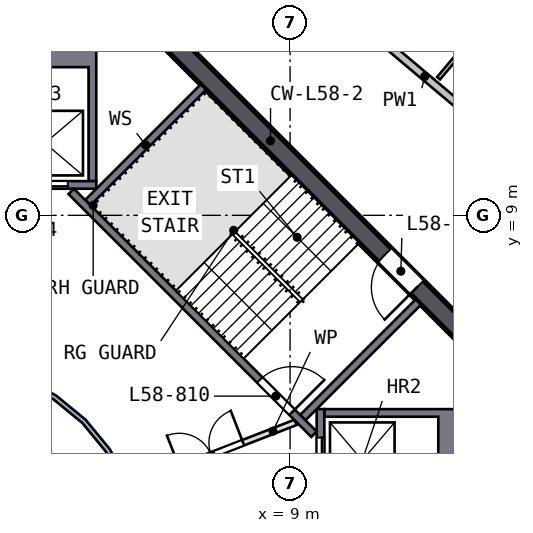
"""IFC4 building model, lengths in metres.
Left out: names, types, materials, properties, quantities, classifications, styles, units other than length and angle.
Written with IfcOpenShell. Run it as: python <this file> out.ifc"""

import sys

from ifc_helpers import new_model, si_unit, direction, frame, frame_2d, origin, place, context, subcontext, project, spatial, polyline, rectangle, outline, extrude, element, fill, save


model = new_model("IFC4")
c1 = context("Model", 3, precision=1e-05, world=origin(), true_north=direction((0.0, 1.0)))
c2 = subcontext(c1, "Body", "Model", "MODEL_VIEW")
j1 = project(units=[si_unit("LENGTHUNIT", "METRE"), si_unit("PLANEANGLEUNIT", "RADIAN")], contexts=[c1])
p1 = place(None, origin())
s1 = spatial("IfcSite", under=j1, at=p1, CompositionType="ELEMENT")
p2 = place(p1, origin())
s2 = spatial("IfcBuilding", under=s1, at=p2, CompositionType="ELEMENT")
p3 = place(p2, frame((0.0, 0.0, 237.5)))
s3 = spatial("IfcBuildingStorey", under=s2, at=p3, CompositionType="ELEMENT", Elevation=237.5)
p4 = place(p3, frame((13.823, 5.622, 0.0), z_axis=(0.0, 0.0, 1.0), x_axis=(-0.707106781, 0.707106781, 0.0)))
e1 = element("IfcWall", 1, at=p4, inside=s3, PredefinedType="SHEAR", context=c2, shape_type="SweptSolid", body=[
    extrude(rectangle(XDim=11.598, YDim=0.5, at=frame_2d((5.799, 0.0))), origin(), (0.0, 0.0, 1.0), 3.5),
])
p5 = place(p4, frame((2.099, 0.0, 0.0)))
e2 = element("IfcOpeningElement", 2, at=p5, cuts=e1, PredefinedType="OPENING", context=c2, shape_type="SweptSolid", body=[
    extrude(rectangle(XDim=1.2, YDim=2.1, at=frame_2d((0.6, 1.05))), frame((0.0, 0.26, 0.0), z_axis=(0.0, -1.0, 0.0), x_axis=(1.0, 0.0, 0.0)), (0.0, 0.0, 1.0), 0.52),
])
p6 = place(p3, origin())
e3 = element("IfcWall", 3, at=p6, inside=s3, PredefinedType="SOLIDWALL", context=c2, shape_type="SweptSolid", body=[
    extrude(outline(polyline([(13.5, 3.9), (13.5, 1.2), (9.9, 1.2), (9.9, 1.4), (12.9, 1.4), (12.9, 3.7), (9.9, 3.7), (9.9, 3.9), (13.5, 3.9)])), origin(), (0.0, 0.0, 1.0), 3.19),
])
p7 = place(p3, frame((9.8, 1.2, 0.0), z_axis=(0.0, 0.0, 1.0), x_axis=(0.0, 1.0, 0.0)))
e4 = element("IfcWall", 4, at=p7, inside=s3, PredefinedType="SOLIDWALL", context=c2, shape_type="SweptSolid", body=[
    extrude(rectangle(XDim=2.7, YDim=0.2, at=frame_2d((1.35, 0.0))), origin(), (0.0, 0.0, 1.0), 3.19),
])
p8 = place(p7, frame((0.75, 0.0, 0.0)))
e5 = element("IfcOpeningElement", 5, at=p8, cuts=e4, PredefinedType="OPENING", context=c2, shape_type="SweptSolid", body=[
    extrude(rectangle(XDim=1.2, YDim=2.1, at=frame_2d((0.6, 1.05))), frame((0.0, 0.11, 0.0), z_axis=(0.0, -1.0, 0.0), x_axis=(1.0, 0.0, 0.0)), (0.0, 0.0, 1.0), 0.22),
])
p9 = place(p3, origin())
e6 = element("IfcWall", 6, at=p9, inside=s3, PredefinedType="SOLIDWALL", context=c2, shape_type="SweptSolid", body=[
    extrude(outline(polyline([(3.9, 9.9), (3.7, 9.9), (3.7, 12.9), (1.4, 12.9), (1.4, 9.9), (1.2, 9.9), (1.2, 13.5), (3.9, 13.5), (3.9, 9.9)])), origin(), (0.0, 0.0, 1.0), 3.19),
])
p10 = place(p3, frame((1.2, 9.8, 0.0), z_axis=(0.0, 0.0, 1.0), x_axis=(1.0, 0.0, 0.0)))
e7 = element("IfcWall", 7, at=p10, inside=s3, PredefinedType="SOLIDWALL", context=c2, shape_type="SweptSolid", body=[
    extrude(rectangle(XDim=2.7, YDim=0.2, at=frame_2d((1.35, 0.0))), origin(), (0.0, 0.0, 1.0), 3.19),
])
p11 = place(p10, frame((0.75, 0.0, 0.0)))
e8 = element("IfcOpeningElement", 8, at=p11, cuts=e7, PredefinedType="OPENING", context=c2, shape_type="SweptSolid", body=[
    extrude(rectangle(XDim=1.2, YDim=2.1, at=frame_2d((0.6, 1.05))), frame((0.0, 0.11, 0.0), z_axis=(0.0, -1.0, 0.0), x_axis=(1.0, 0.0, 0.0)), (0.0, 0.0, 1.0), 0.22),
])
p12 = place(p3, frame((3.24, 9.629, 0.0), z_axis=(0.0, 0.0, 1.0), x_axis=(0.707106781, -0.707106781, 0.0)))
e9 = element("IfcWall", 9, at=p12, inside=s3, PredefinedType="SOLIDWALL", context=c2, shape_type="SweptSolid", body=[
    extrude(rectangle(XDim=9.036, YDim=0.2, at=frame_2d((4.518, 0.0))), origin(), (0.0, 0.0, 1.0), 3.19),
])
p13 = place(p12, frame((7.018, 0.0, 0.0)))
e10 = element("IfcOpeningElement", 10, at=p13, cuts=e9, PredefinedType="OPENING", context=c2, shape_type="SweptSolid", body=[
    extrude(rectangle(XDim=1.2, YDim=2.1, at=frame_2d((0.6, 1.05))), frame((0.0, 0.11, 0.0), z_axis=(0.0, -1.0, 0.0), x_axis=(1.0, 0.0, 0.0)), (0.0, 0.0, 1.0), 0.22),
])
for number, where, z_axis, x_axis in (
    (11, (9.334, 3.677, 0.0), (0.0, 0.0, 1.0), (0.707, 0.707, 0.0)),
    (12, (3.677, 9.334, 0.0), (0.0, 0.0, 1.0), (0.707, 0.707, 0.0)),
):
    element("IfcWall", number, at=place(p3, frame(where, z_axis=z_axis, x_axis=x_axis)), inside=s3, PredefinedType="SOLIDWALL", context=c2, shape_type="SweptSolid", body=[
        extrude(rectangle(XDim=4.3, YDim=0.2, at=frame_2d((2.15, 0.0))), origin(), (0.0, 0.0, 1.0), 3.19),
    ])
p14 = place(p3, frame((4.782, 1.857, 0.0), z_axis=(0.0, 0.0, 1.0), x_axis=(0.932155279, 0.362058746, 0.0)))
e13 = element("IfcWall", 13, at=p14, inside=s3, PredefinedType="PARTITIONING", context=c2, shape_type="SweptSolid", body=[
    extrude(rectangle(XDim=4.682, YDim=0.15, at=frame_2d((2.341, 0.0))), origin(), (0.0, 0.0, 1.0), 3.19),
])
p15 = place(p14, frame((1.4, 0.0, 0.0)))
e14 = element("IfcOpeningElement", 14, at=p15, cuts=e13, PredefinedType="OPENING", context=c2, shape_type="SweptSolid", body=[
    extrude(rectangle(XDim=1.8, YDim=2.1, at=frame_2d((0.9, 1.05))), frame((0.0, 0.085, 0.0), z_axis=(0.0, -1.0, 0.0), x_axis=(1.0, 0.0, 0.0)), (0.0, 0.0, 1.0), 0.17),
])
p16 = place(p3, origin())
e15 = element("IfcWall", 15, at=p16, inside=s3, PredefinedType="SOLIDWALL", context=c2, shape_type="SweptSolid", body=[
    extrude(outline(polyline([(5.021, -0.999), (4.73, -1.959), (4.257, -2.844), (3.62, -3.62), (2.844, -4.257), (1.959, -4.73), (0.999, -5.021), (0.0, -5.12), (-0.999, -5.021), (-1.959, -4.73), (-2.844, -4.257), (-3.62, -3.62), (-4.257, -2.844), (-4.73, -1.959), (-5.021, -0.999), (-5.12, 0.0), (-5.021, 0.999), (-4.73, 1.959), (-4.257, 2.844), (-3.62, 3.62), (-2.844, 4.257), (-1.959, 4.73), (-0.999, 5.021), (0.0, 5.12), (0.999, 5.021), (1.959, 4.73), (2.844, 4.257), (3.62, 3.62), (4.257, 2.844), (4.73, 1.959), (5.021, 0.999), (5.12, 0.0), (5.021, -0.999)]), holes=[polyline([(4.904, 0.976), (4.619, 1.913), (4.157, 2.778), (3.535, 3.535), (2.778, 4.157), (1.913, 4.619), (0.976, 4.904), (0.0, 5.0), (-0.976, 4.904), (-1.913, 4.619), (-2.778, 4.157), (-3.535, 3.535), (-4.157, 2.778), (-4.619, 1.913), (-4.904, 0.976), (-5.0, 0.0), (-4.904, -0.976), (-4.619, -1.913), (-4.157, -2.778), (-3.535, -3.535), (-2.778, -4.157), (-1.913, -4.619), (-0.976, -4.904), (0.0, -5.0), (0.976, -4.904), (1.913, -4.619), (2.778, -4.157), (3.535, -3.535), (4.157, -2.778), (4.619, -1.913), (4.904, -0.976), (5.0, 0.0), (4.904, 0.976)])]), origin(), (0.0, 0.0, 1.0), 3.19),
])
p17 = place(p3, frame((7.793, 16.651, 0.0), z_axis=(0.0, 0.0, 1.0), x_axis=(0.765151702, -0.64385004, 0.0)))
e16 = element("IfcWall", 16, at=p17, inside=s3, PredefinedType="SOLIDWALL", context=c2, shape_type="SweptSolid", body=[
    extrude(rectangle(XDim=9.317, YDim=0.2, at=frame_2d((4.658, 0.0))), origin(), (0.0, 0.0, 1.0), 3.19),
])
p18 = place(p17, frame((1.9, 0.0, 0.0)))
e17 = element("IfcOpeningElement", 17, at=p18, cuts=e16, PredefinedType="OPENING", context=c2, shape_type="SweptSolid", body=[
    extrude(rectangle(XDim=1.0, YDim=2.1, at=frame_2d((0.5, 1.05))), frame((0.0, 0.11, 0.0), z_axis=(0.0, -1.0, 0.0), x_axis=(1.0, 0.0, 0.0)), (0.0, 0.0, 1.0), 0.22),
])
p19 = place(p3, frame((14.904, 14.981, 0.0), z_axis=(0.0, 0.0, 1.0), x_axis=(-0.643817992, -0.765178668, 0.0)))
e18 = element("IfcWall", 18, at=p19, inside=s3, PredefinedType="PARTITIONING", context=c2, shape_type="SweptSolid", body=[
    extrude(rectangle(XDim=3.1, YDim=0.1, at=frame_2d((1.55, 0.0))), origin(), (0.0, 0.0, 1.0), 3.19),
])
p20 = place(p19, frame((1.15, 0.0, 0.0)))
e19 = element("IfcOpeningElement", 19, at=p20, cuts=e18, PredefinedType="OPENING", context=c2, shape_type="SweptSolid", body=[
    extrude(rectangle(XDim=0.9, YDim=2.1, at=frame_2d((0.45, 1.05))), frame((0.0, 0.06, 0.0), z_axis=(0.0, -1.0, 0.0), x_axis=(1.0, 0.0, 0.0)), (0.0, 0.0, 1.0), 0.12),
])
p21 = place(p8, origin())
e20 = element("IfcDoor", 20, at=p21, inside=s3, OperationType="DOUBLE_DOOR_SLIDING", PredefinedType="DOOR", context=c2, shape_type="SweptSolid", body=[
    extrude(rectangle(XDim=1.2, YDim=2.1, at=frame_2d((0.6, 1.05))), frame((0.0, 0.025, 0.0), z_axis=(0.0, -1.0, 0.0), x_axis=(1.0, 0.0, 0.0)), (0.0, 0.0, 1.0), 0.05),
])
fill(e5, e20)
p22 = place(p11, origin())
e21 = element("IfcDoor", 21, at=p22, inside=s3, OperationType="DOUBLE_DOOR_SLIDING", PredefinedType="DOOR", context=c2, shape_type="SweptSolid", body=[
    extrude(rectangle(XDim=1.2, YDim=2.1, at=frame_2d((0.6, 1.05))), frame((0.0, 0.025, 0.0), z_axis=(0.0, -1.0, 0.0), x_axis=(1.0, 0.0, 0.0)), (0.0, 0.0, 1.0), 0.05),
])
fill(e8, e21)
p23 = place(p13, origin())
e22 = element("IfcDoor", 22, at=p23, inside=s3, OperationType="SINGLE_SWING_RIGHT", PredefinedType="DOOR", context=c2, shape_type="SweptSolid", body=[
    extrude(rectangle(XDim=1.2, YDim=2.1, at=frame_2d((0.6, 1.05))), frame((0.0, 0.025, 0.0), z_axis=(0.0, -1.0, 0.0), x_axis=(1.0, 0.0, 0.0)), (0.0, 0.0, 1.0), 0.05),
])
fill(e10, e22)
p24 = place(p5, origin())
e23 = element("IfcDoor", 23, at=p24, inside=s3, OperationType="SINGLE_SWING_LEFT", PredefinedType="DOOR", context=c2, shape_type="SweptSolid", body=[
    extrude(rectangle(XDim=1.2, YDim=2.1, at=frame_2d((0.6, 1.05))), frame((0.0, 0.025, 0.0), z_axis=(0.0, -1.0, 0.0), x_axis=(1.0, 0.0, 0.0)), (0.0, 0.0, 1.0), 0.05),
])
fill(e2, e23)
p25 = place(p15, origin())
e24 = element("IfcDoor", 24, at=p25, inside=s3, OperationType="DOUBLE_DOOR_SINGLE_SWING", PredefinedType="DOOR", context=c2, shape_type="SweptSolid", body=[
    extrude(rectangle(XDim=1.8, YDim=2.1, at=frame_2d((0.9, 1.05))), frame((0.0, 0.025, 0.0), z_axis=(0.0, -1.0, 0.0), x_axis=(1.0, 0.0, 0.0)), (0.0, 0.0, 1.0), 0.05),
])
fill(e14, e24)
save(model, sys.argv[1])
